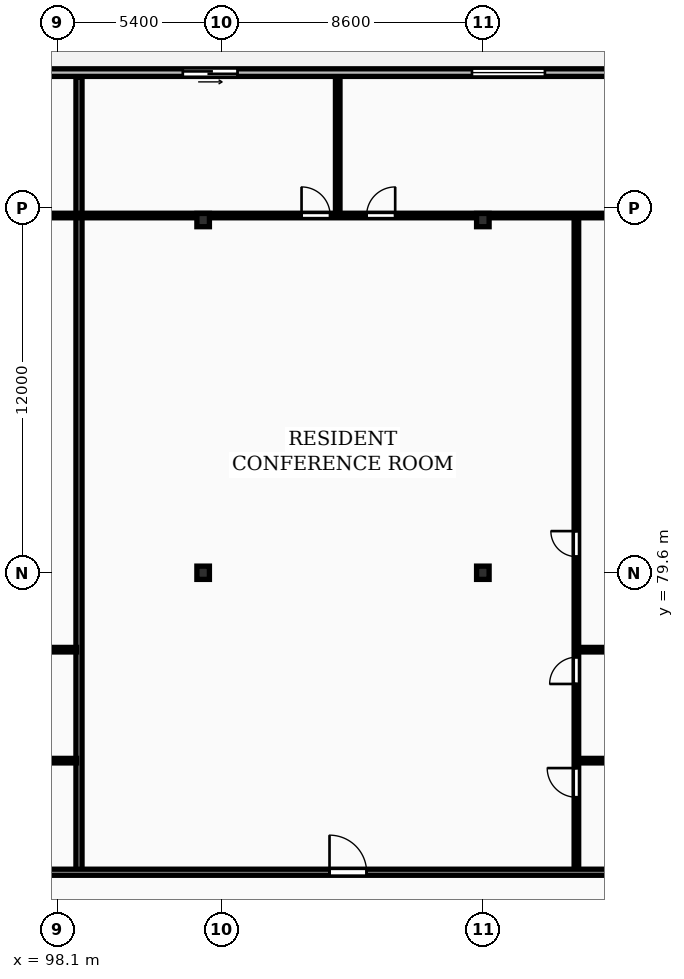
"""IFC4 building model, lengths in metres.
Left out: names, types, materials, properties, quantities, classifications, styles, units other than length and angle.
Written with IfcOpenShell. Run it as: python <this file> out.ifc"""

import sys

from ifc_helpers import new_model, si_unit, direction, frame, frame_2d, origin, origin_2d, place, context, subcontext, project, spatial, rectangle, i_section, extrude, element, fill, save


model = new_model("IFC4")
c1 = context("Model", 3, precision=1e-05, world=origin(), true_north=direction((0.0, 1.0)))
c2 = subcontext(c1, "Body", "Model", "MODEL_VIEW")
j1 = project(units=[si_unit("LENGTHUNIT", "METRE"), si_unit("PLANEANGLEUNIT", "RADIAN")], contexts=[c1])
p1 = place(None, origin())
s1 = spatial("IfcSite", under=j1, at=p1, CompositionType="ELEMENT")
p2 = place(p1, origin())
s2 = spatial("IfcBuilding", under=s1, at=p2, CompositionType="ELEMENT")
p3 = place(p2, frame((0.0, 0.0, 150.1)))
s3 = spatial("IfcBuildingStorey", under=s2, at=p3, CompositionType="ELEMENT", Elevation=150.1)
for number, where, z_axis, x_axis in (
    (1, (102.9, 79.6, 0.0), (0.0, 0.0, 1.0), (1.0, 0.0, 0.0)),
    (2, (102.9, 91.2, 0.0), (0.0, 0.0, 1.0), (1.0, 0.0, 0.0)),
    (3, (112.1, 79.6, 0.0), (0.0, 0.0, 1.0), (1.0, 0.0, 0.0)),
    (4, (112.1, 91.2, 0.0), (0.0, 0.0, 1.0), (1.0, 0.0, 0.0)),
):
    element("IfcColumn", number, at=place(p3, frame(where, z_axis=z_axis, x_axis=x_axis)), inside=s3, PredefinedType="COLUMN", context=c2, shape_type="SweptSolid", body=[
        extrude(i_section(OverallWidth=0.412, OverallDepth=0.437, WebThickness=0.036, FlangeThickness=0.052, FilletRadius=0.015, at=origin_2d()), origin(), (0.0, 0.0, 1.0), 3.6),
    ])
p4 = place(p3, frame((130.6, 96.05, 0.0), z_axis=(0.0, 0.0, 1.0), x_axis=(-1.0, 0.0, 0.0)))
e5 = element("IfcWall", 5, at=p4, inside=s3, PredefinedType="STANDARD", context=c2, shape_type="SweptSolid", body=[
    extrude(rectangle(XDim=73.0, YDim=0.25, at=frame_2d((36.5, 0.0))), origin(), (0.0, 0.0, 1.0), 3.31),
])
p5 = place(p4, frame((67.311, 0.0, 0.0)))
e6 = element("IfcOpeningElement", 6, at=p5, cuts=e5, PredefinedType="OPENING", context=c2, shape_type="SweptSolid", body=[
    extrude(rectangle(XDim=1.8, YDim=2.2, at=frame_2d((0.9, 1.1))), frame((0.0, 0.135, 0.0), z_axis=(0.0, -1.0, 0.0), x_axis=(1.0, 0.0, 0.0)), (0.0, 0.0, 1.0), 0.27),
])
p6 = place(p4, frame((56.252, 0.0, 0.85)))
e7 = element("IfcOpeningElement", 7, at=p6, cuts=e5, PredefinedType="OPENING", context=c2, shape_type="SweptSolid", body=[
    extrude(rectangle(XDim=2.4, YDim=1.9, at=frame_2d((1.2, 0.95))), frame((0.0, 0.135, 0.0), z_axis=(0.0, -1.0, 0.0), x_axis=(1.0, 0.0, 0.0)), (0.0, 0.0, 1.0), 0.27),
])
p7 = place(p4, frame((46.071, 0.0, 0.0)))
e8 = element("IfcOpeningElement", 8, at=p7, cuts=e5, PredefinedType="OPENING", context=c2, shape_type="SweptSolid", body=[
    extrude(rectangle(XDim=1.8, YDim=2.2, at=frame_2d((0.9, 1.1))), frame((0.0, 0.135, 0.0), z_axis=(0.0, -1.0, 0.0), x_axis=(1.0, 0.0, 0.0)), (0.0, 0.0, 1.0), 0.27),
])
p8 = place(p4, frame((36.161, 0.0, 0.85)))
e9 = element("IfcOpeningElement", 9, at=p8, cuts=e5, PredefinedType="OPENING", context=c2, shape_type="SweptSolid", body=[
    extrude(rectangle(XDim=2.4, YDim=1.9, at=frame_2d((1.2, 0.95))), frame((0.0, 0.135, 0.0), z_axis=(0.0, -1.0, 0.0), x_axis=(1.0, 0.0, 0.0)), (0.0, 0.0, 1.0), 0.27),
])
p9 = place(p4, frame((26.569, 0.0, 0.0)))
e10 = element("IfcOpeningElement", 10, at=p9, cuts=e5, PredefinedType="OPENING", context=c2, shape_type="SweptSolid", body=[
    extrude(rectangle(XDim=1.8, YDim=2.2, at=frame_2d((0.9, 1.1))), frame((0.0, 0.135, 0.0), z_axis=(0.0, -1.0, 0.0), x_axis=(1.0, 0.0, 0.0)), (0.0, 0.0, 1.0), 0.27),
])
p10 = place(p4, frame((16.458, 0.0, 0.85)))
e11 = element("IfcOpeningElement", 11, at=p10, cuts=e5, PredefinedType="OPENING", context=c2, shape_type="SweptSolid", body=[
    extrude(rectangle(XDim=2.4, YDim=1.9, at=frame_2d((1.2, 0.95))), frame((0.0, 0.135, 0.0), z_axis=(0.0, -1.0, 0.0), x_axis=(1.0, 0.0, 0.0)), (0.0, 0.0, 1.0), 0.27),
])
p11 = place(p4, frame((7.042, 0.0, 0.0)))
e12 = element("IfcOpeningElement", 12, at=p11, cuts=e5, PredefinedType="OPENING", context=c2, shape_type="SweptSolid", body=[
    extrude(rectangle(XDim=1.8, YDim=2.2, at=frame_2d((0.9, 1.1))), frame((0.0, 0.135, 0.0), z_axis=(0.0, -1.0, 0.0), x_axis=(1.0, 0.0, 0.0)), (0.0, 0.0, 1.0), 0.27),
])
p12 = place(p4, frame((0.9, 0.0, 0.85)))
e13 = element("IfcOpeningElement", 13, at=p12, cuts=e5, PredefinedType="OPENING", context=c2, shape_type="SweptSolid", body=[
    extrude(rectangle(XDim=2.4, YDim=1.9, at=frame_2d((1.2, 0.95))), frame((0.0, 0.135, 0.0), z_axis=(0.0, -1.0, 0.0), x_axis=(1.0, 0.0, 0.0)), (0.0, 0.0, 1.0), 0.27),
])
p13 = place(p3, frame((98.816, 69.83, 0.0), z_axis=(0.0, 0.0, 1.0), x_axis=(0.0, 1.0, 0.0)))
e14 = element("IfcWall", 14, at=p13, inside=s3, PredefinedType="PARTITIONING", context=c2, shape_type="SweptSolid", body=[
    extrude(rectangle(XDim=26.07, YDim=0.2, at=frame_2d((13.035, 0.0))), origin(), (0.0, 0.0, 1.0), 3.31),
])
for number, where, z_axis, x_axis in (
    (15, (95.606, 73.42, 0.0), (0.0, 0.0, 1.0), (1.0, 0.0, 0.0)),
    (16, (95.606, 77.07, 0.0), (0.0, 0.0, 1.0), (1.0, 0.0, 0.0)),
):
    element("IfcWall", number, at=place(p3, frame(where, z_axis=z_axis, x_axis=x_axis)), inside=s3, PredefinedType="PARTITIONING", context=c2, shape_type="SweptSolid", body=[
        extrude(rectangle(XDim=3.13, YDim=0.15, at=frame_2d((1.565, 0.0))), origin(), (0.0, 0.0, 1.0), 3.31),
    ])
p14 = place(p3, frame((79.437, 91.35, 0.0), z_axis=(0.0, 0.0, 1.0), x_axis=(1.0, 0.0, 0.0)))
e17 = element("IfcWall", 17, at=p14, inside=s3, PredefinedType="PARTITIONING", context=c2, shape_type="SweptSolid", body=[
    extrude(rectangle(XDim=19.299, YDim=0.15, at=frame_2d((9.649, 0.0))), origin(), (0.0, 0.0, 1.0), 3.003),
])
p15 = place(p14, frame((7.155, 0.0, 0.0)))
e18 = element("IfcOpeningElement", 18, at=p15, cuts=e17, PredefinedType="OPENING", context=c2, shape_type="SweptSolid", body=[
    extrude(rectangle(XDim=0.94, YDim=2.1, at=frame_2d((0.47, 1.05))), frame((0.0, 0.085, 0.0), z_axis=(0.0, -1.0, 0.0), x_axis=(1.0, 0.0, 0.0)), (0.0, 0.0, 1.0), 0.17),
])
p16 = place(p14, frame((9.179, 0.0, 0.0)))
e19 = element("IfcOpeningElement", 19, at=p16, cuts=e17, PredefinedType="OPENING", context=c2, shape_type="SweptSolid", body=[
    extrude(rectangle(XDim=0.94, YDim=2.1, at=frame_2d((0.47, 1.05))), frame((0.0, 0.085, 0.0), z_axis=(0.0, -1.0, 0.0), x_axis=(1.0, 0.0, 0.0)), (0.0, 0.0, 1.0), 0.17),
])
for number, where, z_axis, x_axis in (
    (20, (115.237, 73.42, 0.0), (0.0, 0.0, 1.0), (1.0, 0.0, 0.0)),
    (21, (115.237, 77.07, 0.0), (0.0, 0.0, 1.0), (1.0, 0.0, 0.0)),
):
    element("IfcWall", number, at=place(p3, frame(where, z_axis=z_axis, x_axis=x_axis)), inside=s3, PredefinedType="PARTITIONING", context=c2, shape_type="SweptSolid", body=[
        extrude(rectangle(XDim=3.36, YDim=0.15, at=frame_2d((1.68, 0.0))), origin(), (0.0, 0.0, 1.0), 3.31),
    ])
p17 = place(p3, frame((115.177, 69.81, 0.0), z_axis=(0.0, 0.0, 1.0), x_axis=(0.0, 1.0, 0.0)))
e22 = element("IfcWall", 22, at=p17, inside=s3, PredefinedType="PARTITIONING", context=c2, shape_type="SweptSolid", body=[
    extrude(rectangle(XDim=21.48, YDim=0.15, at=frame_2d((10.74, 0.0))), origin(), (0.0, 0.0, 1.0), 3.31),
])
p18 = place(p17, frame((2.406, 0.0, 0.0)))
e23 = element("IfcOpeningElement", 23, at=p18, cuts=e22, PredefinedType="OPENING", context=c2, shape_type="SweptSolid", body=[
    extrude(rectangle(XDim=0.96, YDim=2.1, at=frame_2d((0.48, 1.05))), frame((0.0, 0.085, 0.0), z_axis=(0.0, -1.0, 0.0), x_axis=(1.0, 0.0, 0.0)), (0.0, 0.0, 1.0), 0.17),
])
p19 = place(p17, frame((6.133, 0.0, 0.0)))
e24 = element("IfcOpeningElement", 24, at=p19, cuts=e22, PredefinedType="OPENING", context=c2, shape_type="SweptSolid", body=[
    extrude(rectangle(XDim=0.88, YDim=2.06, at=frame_2d((0.44, 1.03))), frame((0.0, 0.085, 0.0), z_axis=(0.0, -1.0, 0.0), x_axis=(1.0, 0.0, 0.0)), (0.0, 0.0, 1.0), 0.17),
])
p20 = place(p17, frame((10.32, 0.0, 0.0)))
e25 = element("IfcOpeningElement", 25, at=p20, cuts=e22, PredefinedType="OPENING", context=c2, shape_type="SweptSolid", body=[
    extrude(rectangle(XDim=0.84, YDim=2.04, at=frame_2d((0.42, 1.02))), frame((0.0, 0.085, 0.0), z_axis=(0.0, -1.0, 0.0), x_axis=(1.0, 0.0, 0.0)), (0.0, 0.0, 1.0), 0.17),
])
p21 = place(p3, frame((107.327, 91.43, 0.0), z_axis=(0.0, 0.0, 1.0), x_axis=(0.0, 1.0, 0.0)))
e26 = element("IfcWall", 26, at=p21, inside=s3, PredefinedType="PARTITIONING", context=c2, shape_type="SweptSolid", body=[
    extrude(rectangle(XDim=4.47, YDim=0.15, at=frame_2d((2.235, 0.0))), origin(), (0.0, 0.0, 1.0), 3.31),
])
p22 = place(p3, frame((98.896, 91.35, 0.0), z_axis=(0.0, 0.0, 1.0), x_axis=(1.0, 0.0, 0.0)))
e27 = element("IfcWall", 27, at=p22, inside=s3, PredefinedType="PARTITIONING", context=c2, shape_type="SweptSolid", body=[
    extrude(rectangle(XDim=19.701, YDim=0.15, at=frame_2d((9.851, 0.0))), origin(), (0.0, 0.0, 1.0), 3.003),
])
p23 = place(p22, frame((7.24, 0.0, 0.0)))
e28 = element("IfcOpeningElement", 28, at=p23, cuts=e27, PredefinedType="OPENING", context=c2, shape_type="SweptSolid", body=[
    extrude(rectangle(XDim=0.94, YDim=2.1, at=frame_2d((0.47, 1.05))), frame((0.0, 0.085, 0.0), z_axis=(0.0, -1.0, 0.0), x_axis=(1.0, 0.0, 0.0)), (0.0, 0.0, 1.0), 0.17),
])
p24 = place(p22, frame((9.381, 0.0, 0.0)))
e29 = element("IfcOpeningElement", 29, at=p24, cuts=e27, PredefinedType="OPENING", context=c2, shape_type="SweptSolid", body=[
    extrude(rectangle(XDim=0.94, YDim=2.1, at=frame_2d((0.47, 1.05))), frame((0.0, 0.085, 0.0), z_axis=(0.0, -1.0, 0.0), x_axis=(1.0, 0.0, 0.0)), (0.0, 0.0, 1.0), 0.17),
])
p25 = place(p3, frame((57.6, 69.75, 0.0), z_axis=(0.0, 0.0, 1.0), x_axis=(1.0, 0.0, 0.0)))
e30 = element("IfcWall", 30, at=p25, inside=s3, PredefinedType="PARTITIONING", context=c2, shape_type="SweptSolid", body=[
    extrude(rectangle(XDim=73.0, YDim=0.2, at=frame_2d((36.5, 0.0))), origin(), (0.0, 0.0, 1.0), 3.31),
])
p26 = place(p25, frame((9.189, 0.0, 0.0)))
e31 = element("IfcOpeningElement", 31, at=p26, cuts=e30, PredefinedType="OPENING", context=c2, shape_type="SweptSolid", body=[
    extrude(rectangle(XDim=1.22, YDim=2.18, at=frame_2d((0.61, 1.09))), frame((0.0, 0.11, 0.0), z_axis=(0.0, -1.0, 0.0), x_axis=(1.0, 0.0, 0.0)), (0.0, 0.0, 1.0), 0.22),
])
p27 = place(p25, frame((29.912, 0.0, 0.0)))
e32 = element("IfcOpeningElement", 32, at=p27, cuts=e30, PredefinedType="OPENING", context=c2, shape_type="SweptSolid", body=[
    extrude(rectangle(XDim=1.22, YDim=2.18, at=frame_2d((0.61, 1.09))), frame((0.0, 0.11, 0.0), z_axis=(0.0, -1.0, 0.0), x_axis=(1.0, 0.0, 0.0)), (0.0, 0.0, 1.0), 0.22),
])
p28 = place(p25, frame((49.457, 0.0, 0.0)))
e33 = element("IfcOpeningElement", 33, at=p28, cuts=e30, PredefinedType="OPENING", context=c2, shape_type="SweptSolid", body=[
    extrude(rectangle(XDim=1.22, YDim=2.18, at=frame_2d((0.61, 1.09))), frame((0.0, 0.11, 0.0), z_axis=(0.0, -1.0, 0.0), x_axis=(1.0, 0.0, 0.0)), (0.0, 0.0, 1.0), 0.22),
])
p29 = place(p25, frame((63.122, 0.0, 0.0)))
e34 = element("IfcOpeningElement", 34, at=p29, cuts=e30, PredefinedType="OPENING", context=c2, shape_type="SweptSolid", body=[
    extrude(rectangle(XDim=0.95, YDim=2.15, at=frame_2d((0.475, 1.075))), frame((0.0, 0.11, 0.0), z_axis=(0.0, -1.0, 0.0), x_axis=(1.0, 0.0, 0.0)), (0.0, 0.0, 1.0), 0.22),
])
p30 = place(p9, origin())
e35 = element("IfcDoor", 35, at=p30, inside=s3, OperationType="SLIDING_TO_LEFT", PredefinedType="DOOR", context=c2, shape_type="SweptSolid", body=[
    extrude(rectangle(XDim=1.8, YDim=2.2, at=frame_2d((0.9, 1.1))), frame((0.0, 0.025, 0.0), z_axis=(0.0, -1.0, 0.0), x_axis=(1.0, 0.0, 0.0)), (0.0, 0.0, 1.0), 0.05),
])
fill(e10, e35)
p31 = place(p10, origin())
e36 = element("IfcWindow", 36, at=p31, inside=s3, PartitioningType="DOUBLE_PANEL_VERTICAL", PredefinedType="WINDOW", context=c2, shape_type="SweptSolid", body=[
    extrude(rectangle(XDim=2.4, YDim=1.9, at=frame_2d((1.2, 0.95))), frame((0.0, 0.03, 0.0), z_axis=(0.0, -1.0, 0.0), x_axis=(1.0, 0.0, 0.0)), (0.0, 0.0, 1.0), 0.06),
])
fill(e11, e36)
p32 = place(p18, origin())
e37 = element("IfcDoor", 37, at=p32, inside=s3, OperationType="SINGLE_SWING_RIGHT", PredefinedType="DOOR", context=c2, shape_type="SweptSolid", body=[
    extrude(rectangle(XDim=0.96, YDim=2.1, at=frame_2d((0.48, 1.05))), frame((0.0, 0.025, 0.0), z_axis=(0.0, -1.0, 0.0), x_axis=(1.0, 0.0, 0.0)), (0.0, 0.0, 1.0), 0.05),
])
fill(e23, e37)
p33 = place(p19, origin())
e38 = element("IfcDoor", 38, at=p33, inside=s3, OperationType="SINGLE_SWING_LEFT", PredefinedType="DOOR", context=c2, shape_type="SweptSolid", body=[
    extrude(rectangle(XDim=0.88, YDim=2.06, at=frame_2d((0.44, 1.03))), frame((0.0, 0.025, 0.0), z_axis=(0.0, -1.0, 0.0), x_axis=(1.0, 0.0, 0.0)), (0.0, 0.0, 1.0), 0.05),
])
fill(e24, e38)
p34 = place(p20, origin())
e39 = element("IfcDoor", 39, at=p34, inside=s3, OperationType="SINGLE_SWING_RIGHT", PredefinedType="DOOR", context=c2, shape_type="SweptSolid", body=[
    extrude(rectangle(XDim=0.84, YDim=2.04, at=frame_2d((0.42, 1.02))), frame((0.0, 0.025, 0.0), z_axis=(0.0, -1.0, 0.0), x_axis=(1.0, 0.0, 0.0)), (0.0, 0.0, 1.0), 0.05),
])
fill(e25, e39)
p35 = place(p23, origin())
e40 = element("IfcDoor", 40, at=p35, inside=s3, OperationType="SINGLE_SWING_LEFT", PredefinedType="DOOR", context=c2, shape_type="SweptSolid", body=[
    extrude(rectangle(XDim=0.94, YDim=2.1, at=frame_2d((0.47, 1.05))), frame((0.0, 0.025, 0.0), z_axis=(0.0, -1.0, 0.0), x_axis=(1.0, 0.0, 0.0)), (0.0, 0.0, 1.0), 0.05),
])
fill(e28, e40)
p36 = place(p24, origin())
e41 = element("IfcDoor", 41, at=p36, inside=s3, OperationType="SINGLE_SWING_RIGHT", PredefinedType="DOOR", context=c2, shape_type="SweptSolid", body=[
    extrude(rectangle(XDim=0.94, YDim=2.1, at=frame_2d((0.47, 1.05))), frame((0.0, 0.025, 0.0), z_axis=(0.0, -1.0, 0.0), x_axis=(1.0, 0.0, 0.0)), (0.0, 0.0, 1.0), 0.05),
])
fill(e29, e41)
p37 = place(p28, origin())
e42 = element("IfcDoor", 42, at=p37, inside=s3, OperationType="SINGLE_SWING_LEFT", PredefinedType="DOOR", context=c2, shape_type="SweptSolid", body=[
    extrude(rectangle(XDim=1.22, YDim=2.18, at=frame_2d((0.61, 1.09))), frame((0.0, 0.025, 0.0), z_axis=(0.0, -1.0, 0.0), x_axis=(1.0, 0.0, 0.0)), (0.0, 0.0, 1.0), 0.05),
])
fill(e33, e42)
save(model, sys.argv[1])
